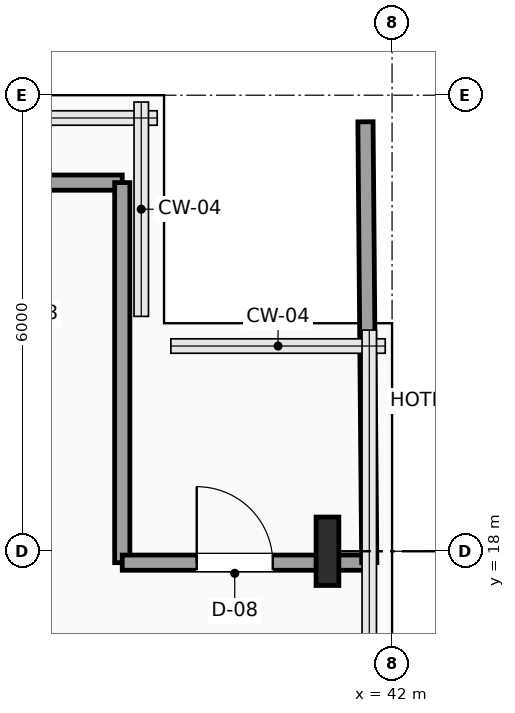
"""IFC4 building model, lengths in metres.
Left out: names, types, materials, properties, quantities, classifications, styles, units other than length and angle.
Written with IfcOpenShell. Run it as: python <this file> out.ifc"""

import sys

from ifc_helpers import new_model, si_unit, direction, frame, frame_2d, origin, origin_2d, place, context, subcontext, project, spatial, rectangle, i_section, extrude, element, fill, save


model = new_model("IFC4")
c1 = context("Model", 3, precision=1e-05, world=origin(), true_north=direction((0.0, 1.0)))
c2 = subcontext(c1, "Body", "Model", "MODEL_VIEW")
j1 = project(units=[si_unit("LENGTHUNIT", "METRE"), si_unit("PLANEANGLEUNIT", "RADIAN")], contexts=[c1])
p1 = place(None, origin())
s1 = spatial("IfcSite", under=j1, at=p1, CompositionType="ELEMENT")
p2 = place(p1, origin())
s2 = spatial("IfcBuilding", under=s1, at=p2, CompositionType="ELEMENT")
p3 = place(p2, frame((0.0, 0.0, 172.95)))
s3 = spatial("IfcBuildingStorey", under=s2, at=p3, CompositionType="ELEMENT", Elevation=172.95)
p4 = place(p3, frame((41.15, 18.0, 0.0), z_axis=(0.0, 0.0, 1.0), x_axis=(1.0, 0.0, 0.0)))
e1 = element("IfcColumn", 1, at=p4, inside=s3, PredefinedType="COLUMN", context=c2, shape_type="SweptSolid", body=[
    extrude(i_section(OverallWidth=0.3, OverallDepth=0.9, WebThickness=0.019, FlangeThickness=0.035, FilletRadius=0.03, at=origin_2d()), origin(), (0.0, 0.0, 1.0), 3.75),
])
p5 = place(p3, frame((36.35, 22.85, 0.0), z_axis=(0.0, 0.0, 1.0), x_axis=(1.0, 0.0, 0.0)))
e2 = element("IfcWall", 2, at=p5, inside=s3, PredefinedType="PARTITIONING", context=c2, shape_type="SweptSolid", body=[
    extrude(rectangle(XDim=2.1, YDim=0.2, at=frame_2d((1.05, 0.0))), origin(), (0.0, 0.0, 1.0), 3.54),
])
p6 = place(p3, frame((38.45, 22.85, 0.0), z_axis=(0.0, 0.0, 1.0), x_axis=(0.0, -1.0, 0.0)))
e3 = element("IfcWall", 3, at=p6, inside=s3, PredefinedType="PARTITIONING", context=c2, shape_type="SweptSolid", body=[
    extrude(rectangle(XDim=5.0, YDim=0.2, at=frame_2d((2.5, 0.0))), origin(), (0.0, 0.0, 1.0), 3.54),
])
p7 = place(p3, frame((38.45, 17.85, 0.0), z_axis=(0.0, 0.0, 1.0), x_axis=(1.0, 0.0, 0.0)))
e4 = element("IfcWall", 4, at=p7, inside=s3, PredefinedType="PARTITIONING", context=c2, shape_type="SweptSolid", body=[
    extrude(rectangle(XDim=3.25, YDim=0.2, at=frame_2d((1.625, 0.0))), origin(), (0.0, 0.0, 1.0), 3.132),
])
p8 = place(p7, frame((0.98, 0.0, 0.0)))
e5 = element("IfcOpeningElement", 5, at=p8, cuts=e4, PredefinedType="OPENING", context=c2, shape_type="SweptSolid", body=[
    extrude(rectangle(XDim=1.0, YDim=2.2, at=frame_2d((0.5, 1.1))), frame((0.0, 0.11, 0.0), z_axis=(0.0, -1.0, 0.0), x_axis=(1.0, 0.0, 0.0)), (0.0, 0.0, 1.0), 0.22),
])
p9 = place(p3, frame((41.7, 17.85, 0.0), z_axis=(0.0, 0.0, 1.0), x_axis=(-0.008629077606, 0.999962768817, 0.0)))
e6 = element("IfcWall", 6, at=p9, inside=s3, PredefinedType="PARTITIONING", context=c2, shape_type="SweptSolid", body=[
    extrude(rectangle(XDim=5.8, YDim=0.2, at=frame_2d((2.9, 0.0))), origin(), (0.0, 0.0, 1.0), 3.54),
])
p10 = place(p8, origin())
e7 = element("IfcDoor", 7, at=p10, inside=s3, OperationType="SINGLE_SWING_LEFT", PredefinedType="DOOR", context=c2, shape_type="SweptSolid", body=[
    extrude(rectangle(XDim=1.0, YDim=2.2, at=frame_2d((0.5, 1.1))), frame((0.0, 0.025, 0.0), z_axis=(0.0, -1.0, 0.0), x_axis=(1.0, 0.0, 0.0)), (0.0, 0.0, 1.0), 0.05),
])
fill(e5, e7)
save(model, sys.argv[1])
